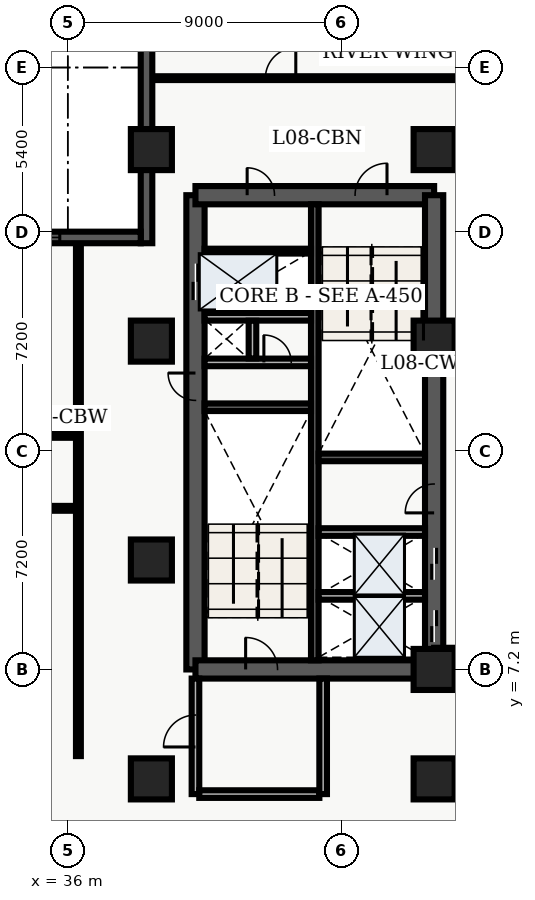
"""IFC4 building model, lengths in metres.
Left out: names, types, materials, properties, quantities, classifications, styles, units other than length and angle.
Written with IfcOpenShell. Run it as: python <this file> out.ifc"""

import sys

from ifc_helpers import new_model, entity, si_unit, converted_unit, direction, frame, origin_with_axes, origin_2d_with_axis, place, context, subcontext, project, spatial, polyline, rectangle, outline, extrude, element, fill, save


model = new_model("IFC4")
c1 = context("Model", 3, precision=1e-05, world=origin_with_axes(), true_north=direction((0.0, 1.0)))
c2 = subcontext(c1, "Body", "Model", "MODEL_VIEW")
j1 = project(units=[si_unit("LENGTHUNIT", "METRE"), converted_unit("PLANEANGLEUNIT", "DEGREE", entity("IfcPlaneAngleMeasure", 0.017), si_unit("PLANEANGLEUNIT", "RADIAN"), dimensions=[0, 0, 0, 0, 0, 0, 0])], contexts=[c1])
p1 = place(None, origin_with_axes())
s1 = spatial("IfcSite", under=j1, at=p1, CompositionType="ELEMENT")
p2 = place(p1, origin_with_axes())
s2 = spatial("IfcBuilding", under=s1, at=p2, CompositionType="ELEMENT")
p3 = place(p2, frame((0.0, 0.0, 36.6), z_axis=(0.0, 0.0, 1.0), x_axis=(1.0, 0.0, 0.0)))
s3 = spatial("IfcBuildingStorey", under=s2, at=p3, CompositionType="ELEMENT", Elevation=36.6)
p4 = place(p3, frame((40.2, 7.2, 0.0), z_axis=(0.0, 0.0, 1.0), x_axis=(0.0, 1.0, 0.0)))
e1 = element("IfcWall", 1, at=p4, inside=s3, PredefinedType="SHEAR", context=c2, shape_type="SweptSolid", body=[
    extrude(outline(polyline([(0.0, -0.3), (15.6, -0.3), (15.6, 0.3), (0.0, 0.3), (0.0, -0.3)])), origin_with_axes(), (0.0, 0.0, 1.0), 3.66),
])
p5 = place(p4, frame((12.75, 0.0, 0.0), z_axis=(0.0, 0.0, 1.0), x_axis=(1.0, 0.0, 0.0)))
e2 = element("IfcOpeningElement", 2, at=p5, cuts=e1, PredefinedType="OPENING", context=c2, shape_type="SweptSolid", body=[
    extrude(rectangle(XDim=1.2, YDim=0.62, at=origin_2d_with_axis()), origin_with_axes(), (0.0, 0.0, 1.0), 2.15),
])
p6 = place(p4, frame((9.3, 0.0, 0.0), z_axis=(0.0, 0.0, 1.0), x_axis=(1.0, 0.0, 0.0)))
e3 = element("IfcOpeningElement", 3, at=p6, cuts=e1, PredefinedType="OPENING", context=c2, shape_type="SweptSolid", body=[
    extrude(rectangle(XDim=0.9, YDim=0.62, at=origin_2d_with_axis()), origin_with_axes(), (0.0, 0.0, 1.0), 2.15),
])
p7 = place(p3, frame((40.2, 7.2, 0.0), z_axis=(0.0, 0.0, 1.0), x_axis=(1.0, 0.0, 0.0)))
e4 = element("IfcWall", 4, at=p7, inside=s3, PredefinedType="SHEAR", context=c2, shape_type="SweptSolid", body=[
    extrude(outline(polyline([(0.0, -0.3), (7.85, -0.3), (7.85, 0.3), (0.0, 0.3), (0.0, -0.3)])), origin_with_axes(), (0.0, 0.0, 1.0), 3.66),
])
p8 = place(p7, frame((2.175, 0.0, 0.0), z_axis=(0.0, 0.0, 1.0), x_axis=(1.0, 0.0, 0.0)))
e5 = element("IfcOpeningElement", 5, at=p8, cuts=e4, PredefinedType="OPENING", context=c2, shape_type="SweptSolid", body=[
    extrude(rectangle(XDim=1.05, YDim=0.62, at=origin_2d_with_axis()), origin_with_axes(), (0.0, 0.0, 1.0), 2.15),
])
p9 = place(p3, frame((40.2, 22.8, 0.0), z_axis=(0.0, 0.0, 1.0), x_axis=(1.0, 0.0, 0.0)))
e6 = element("IfcWall", 6, at=p9, inside=s3, PredefinedType="SHEAR", context=c2, shape_type="SweptSolid", body=[
    extrude(outline(polyline([(0.0, -0.3), (7.85, -0.3), (7.85, 0.3), (0.0, 0.3), (0.0, -0.3)])), origin_with_axes(), (0.0, 0.0, 1.0), 3.66),
])
p10 = place(p9, frame((5.775, 0.0, 0.0), z_axis=(0.0, 0.0, 1.0), x_axis=(1.0, 0.0, 0.0)))
e7 = element("IfcOpeningElement", 7, at=p10, cuts=e6, PredefinedType="OPENING", context=c2, shape_type="SweptSolid", body=[
    extrude(rectangle(XDim=1.05, YDim=0.62, at=origin_2d_with_axis()), origin_with_axes(), (0.0, 0.0, 1.0), 2.15),
])
p11 = place(p9, frame((2.15, 0.0, 0.0), z_axis=(0.0, 0.0, 1.0), x_axis=(1.0, 0.0, 0.0)))
e8 = element("IfcOpeningElement", 8, at=p11, cuts=e6, PredefinedType="OPENING", context=c2, shape_type="SweptSolid", body=[
    extrude(rectangle(XDim=0.9, YDim=0.62, at=origin_2d_with_axis()), origin_with_axes(), (0.0, 0.0, 1.0), 2.15),
])
p12 = place(p3, frame((48.05, 7.2, 0.0), z_axis=(0.0, 0.0, 1.0), x_axis=(0.0, 1.0, 0.0)))
e9 = element("IfcWall", 9, at=p12, inside=s3, PredefinedType="SHEAR", context=c2, shape_type="SweptSolid", body=[
    extrude(outline(polyline([(0.0, -0.3), (15.6, -0.3), (15.6, 0.3), (0.0, 0.3), (0.0, -0.3)])), origin_with_axes(), (0.0, 0.0, 1.0), 3.66),
])
p13 = place(p12, frame((1.425, 0.0, 0.0), z_axis=(0.0, 0.0, 1.0), x_axis=(1.0, 0.0, 0.0)))
e10 = element("IfcOpeningElement", 10, at=p13, cuts=e9, PredefinedType="OPENING", context=c2, shape_type="SweptSolid", body=[
    extrude(rectangle(XDim=1.05, YDim=0.62, at=origin_2d_with_axis()), origin_with_axes(), (0.0, 0.0, 1.0), 2.15),
])
p14 = place(p12, frame((3.475, 0.0, 0.0), z_axis=(0.0, 0.0, 1.0), x_axis=(1.0, 0.0, 0.0)))
e11 = element("IfcOpeningElement", 11, at=p14, cuts=e9, PredefinedType="OPENING", context=c2, shape_type="SweptSolid", body=[
    extrude(rectangle(XDim=1.05, YDim=0.62, at=origin_2d_with_axis()), origin_with_axes(), (0.0, 0.0, 1.0), 2.15),
])
p15 = place(p12, frame((5.625, 0.0, 0.0), z_axis=(0.0, 0.0, 1.0), x_axis=(1.0, 0.0, 0.0)))
e12 = element("IfcOpeningElement", 12, at=p15, cuts=e9, PredefinedType="OPENING", context=c2, shape_type="SweptSolid", body=[
    extrude(rectangle(XDim=0.95, YDim=0.62, at=origin_2d_with_axis()), origin_with_axes(), (0.0, 0.0, 1.0), 2.15),
])
p16 = place(p3, frame((44.125, 7.5, 0.0), z_axis=(0.0, 0.0, 1.0), x_axis=(0.0, 1.0, 0.0)))
e13 = element("IfcWall", 13, at=p16, inside=s3, PredefinedType="SHEAR", context=c2, shape_type="SweptSolid", body=[
    extrude(outline(polyline([(0.0, -0.125), (15.0, -0.125), (15.0, 0.125), (0.0, 0.125), (0.0, -0.125)])), origin_with_axes(), (0.0, 0.0, 1.0), 3.66),
])
for number, where, z_axis, x_axis in (
    (14, (40.5, 15.825, 0.0), (0.0, 0.0, 1.0), (1.0, 0.0, 0.0)),
    (15, (44.25, 14.175, 0.0), (0.0, 0.0, 1.0), (1.0, 0.0, 0.0)),
):
    element("IfcWall", number, at=place(p3, frame(where, z_axis=z_axis, x_axis=x_axis)), inside=s3, PredefinedType="SHEAR", context=c2, shape_type="SweptSolid", body=[
        extrude(outline(polyline([(0.0, -0.125), (3.5, -0.125), (3.5, 0.125), (0.0, 0.125), (0.0, -0.125)])), origin_with_axes(), (0.0, 0.0, 1.0), 3.66),
    ])
p17 = place(p3, frame((40.5, 17.3, 0.0), z_axis=(0.0, 0.0, 1.0), x_axis=(1.0, 0.0, 0.0)))
e16 = element("IfcWall", 16, at=p17, inside=s3, PredefinedType="SOLIDWALL", context=c2, shape_type="SweptSolid", body=[
    extrude(outline(polyline([(0.0, -0.125), (3.5, -0.125), (3.5, 0.125), (0.0, 0.125), (0.0, -0.125)])), origin_with_axes(), (0.0, 0.0, 1.0), 2.7),
])
p18 = place(p17, frame((2.4, 0.0, 0.0), z_axis=(0.0, 0.0, 1.0), x_axis=(1.0, 0.0, 0.0)))
e17 = element("IfcOpeningElement", 17, at=p18, cuts=e16, PredefinedType="OPENING", context=c2, shape_type="SweptSolid", body=[
    extrude(rectangle(XDim=0.9, YDim=0.27, at=origin_2d_with_axis()), origin_with_axes(), (0.0, 0.0, 1.0), 2.15),
])
p19 = place(p3, frame((40.5, 18.8, 0.0), z_axis=(0.0, 0.0, 1.0), x_axis=(1.0, 0.0, 0.0)))
e18 = element("IfcWall", 18, at=p19, inside=s3, PredefinedType="SOLIDWALL", context=c2, shape_type="SweptSolid", body=[
    extrude(outline(polyline([(0.0, -0.125), (3.5, -0.125), (3.5, 0.125), (0.0, 0.125), (0.0, -0.125)])), origin_with_axes(), (0.0, 0.0, 1.0), 2.7),
])
p20 = place(p3, frame((42.075, 17.43, 0.0), z_axis=(0.0, 0.0, 1.0), x_axis=(0.0, 1.0, 0.0)))
e19 = element("IfcWall", 19, at=p20, inside=s3, PredefinedType="SOLIDWALL", context=c2, shape_type="SweptSolid", body=[
    extrude(outline(polyline([(0.0, -0.125), (1.24, -0.125), (1.24, 0.125), (0.0, 0.125), (0.0, -0.125)])), origin_with_axes(), (0.0, 0.0, 1.0), 2.7),
])
p21 = place(p3, frame((40.2, 3.1, 0.0), z_axis=(0.0, 0.0, 1.0), x_axis=(0.0, 1.0, 0.0)))
e20 = element("IfcWall", 20, at=p21, inside=s3, PredefinedType="SOLIDWALL", context=c2, shape_type="SweptSolid", body=[
    extrude(outline(polyline([(0.0, -0.125), (3.8, -0.125), (3.8, 0.125), (0.0, 0.125), (0.0, -0.125)])), origin_with_axes(), (0.0, 0.0, 1.0), 2.7),
])
p22 = place(p21, frame((2.075, 0.0, 0.0), z_axis=(0.0, 0.0, 1.0), x_axis=(1.0, 0.0, 0.0)))
e21 = element("IfcOpeningElement", 21, at=p22, cuts=e20, PredefinedType="OPENING", context=c2, shape_type="SweptSolid", body=[
    extrude(rectangle(XDim=1.05, YDim=0.27, at=origin_2d_with_axis()), origin_with_axes(), (0.0, 0.0, 1.0), 2.15),
])
p23 = place(p3, frame((40.325, 3.1, 0.0), z_axis=(0.0, 0.0, 1.0), x_axis=(1.0, 0.0, 0.0)))
e22 = element("IfcWall", 22, at=p23, inside=s3, PredefinedType="SOLIDWALL", context=c2, shape_type="SweptSolid", body=[
    extrude(outline(polyline([(0.0, -0.125), (3.95, -0.125), (3.95, 0.125), (0.0, 0.125), (0.0, -0.125)])), origin_with_axes(), (0.0, 0.0, 1.0), 2.7),
])
p24 = place(p3, frame((44.4, 3.1, 0.0), z_axis=(0.0, 0.0, 1.0), x_axis=(0.0, 1.0, 0.0)))
e23 = element("IfcWall", 23, at=p24, inside=s3, PredefinedType="SOLIDWALL", context=c2, shape_type="SweptSolid", body=[
    extrude(outline(polyline([(0.0, -0.125), (3.8, -0.125), (3.8, 0.125), (0.0, 0.125), (0.0, -0.125)])), origin_with_axes(), (0.0, 0.0, 1.0), 2.7),
])
for number, where, z_axis, x_axis in (
    (24, (38.75, 3.6, 0.0), (0.0, 0.0, 1.0), (1.0, 0.0, 0.0)),
    (25, (38.75, 10.8, 0.0), (0.0, 0.0, 1.0), (1.0, 0.0, 0.0)),
    (26, (38.75, 18.0, 0.0), (0.0, 0.0, 1.0), (1.0, 0.0, 0.0)),
    (27, (38.75, 24.3, 0.0), (0.0, 0.0, 1.0), (1.0, 0.0, 0.0)),
    (28, (48.05, 3.6, 0.0), (0.0, 0.0, 1.0), (1.0, 0.0, 0.0)),
    (29, (48.05, 7.2, 0.0), (0.0, 0.0, 1.0), (1.0, 0.0, 0.0)),
    (30, (48.05, 18.0, 0.0), (0.0, 0.0, 1.0), (1.0, 0.0, 0.0)),
    (31, (48.05, 24.3, 0.0), (0.0, 0.0, 1.0), (1.0, 0.0, 0.0)),
):
    element("IfcColumn", number, at=place(p3, frame(where, z_axis=z_axis, x_axis=x_axis)), inside=s3, PredefinedType="COLUMN", context=c2, shape_type="SweptSolid", body=[
        extrude(rectangle(XDim=1.35, YDim=1.35, at=origin_2d_with_axis()), origin_with_axes(), (0.0, 0.0, 1.0), 3.9),
    ])
p25 = place(p3, frame((40.5, 20.96, 0.0), z_axis=(0.0, 0.0, 1.0), x_axis=(1.0, 0.0, 0.0)))
e32 = element("IfcWall", 32, at=p25, inside=s3, PredefinedType="PARTITIONING", context=c2, shape_type="SweptSolid", body=[
    extrude(outline(polyline([(0.0, -0.08), (3.5, -0.08), (3.5, 0.08), (0.0, 0.08), (0.0, -0.08)])), origin_with_axes(), (0.0, 0.0, 1.0), 2.7),
])
for number, where, z_axis, x_axis in (
    (33, (44.25, 9.62, 0.0), (0.0, 0.0, 1.0), (1.0, 0.0, 0.0)),
    (34, (44.25, 11.72, 0.0), (0.0, 0.0, 1.0), (1.0, 0.0, 0.0)),
):
    element("IfcWall", number, at=place(p3, frame(where, z_axis=z_axis, x_axis=x_axis)), inside=s3, PredefinedType="SOLIDWALL", context=c2, shape_type="SweptSolid", body=[
        extrude(outline(polyline([(0.0, -0.125), (3.5, -0.125), (3.5, 0.125), (0.0, 0.125), (0.0, -0.125)])), origin_with_axes(), (0.0, 0.0, 1.0), 2.7),
    ])
p26 = place(p3, frame((21.15, 12.5, 0.0), z_axis=(0.0, 0.0, 1.0), x_axis=(1.0, 0.0, 0.0)))
e35 = element("IfcWall", 35, at=p26, inside=s3, PredefinedType="PARTITIONING", context=c2, shape_type="SweptSolid", body=[
    extrude(outline(polyline([(0.0, -0.08), (15.2, -0.08), (15.2, 0.08), (0.0, 0.08), (0.0, -0.08)])), origin_with_axes(), (0.0, 0.0, 1.0), 2.7),
])
p27 = place(p26, frame((3.508, 0.0, 0.0), z_axis=(0.0, 0.0, 1.0), x_axis=(1.0, 0.0, 0.0)))
e36 = element("IfcOpeningElement", 36, at=p27, cuts=e35, PredefinedType="OPENING", context=c2, shape_type="SweptSolid", body=[
    extrude(rectangle(XDim=1.0, YDim=0.18, at=origin_2d_with_axis()), origin_with_axes(), (0.0, 0.0, 1.0), 2.15),
])
p28 = place(p26, frame((10.978, 0.0, 0.0), z_axis=(0.0, 0.0, 1.0), x_axis=(1.0, 0.0, 0.0)))
e37 = element("IfcOpeningElement", 37, at=p28, cuts=e35, PredefinedType="OPENING", context=c2, shape_type="SweptSolid", body=[
    extrude(rectangle(XDim=1.2, YDim=0.18, at=origin_2d_with_axis()), origin_with_axes(), (0.0, 0.0, 1.0), 2.2),
])
p29 = place(p3, frame((21.15, 14.9, 0.0), z_axis=(0.0, 0.0, 1.0), x_axis=(1.0, 0.0, 0.0)))
e38 = element("IfcWall", 38, at=p29, inside=s3, PredefinedType="PARTITIONING", context=c2, shape_type="SweptSolid", body=[
    extrude(outline(polyline([(0.0, -0.08), (15.2, -0.08), (15.2, 0.08), (0.0, 0.08), (0.0, -0.08)])), origin_with_axes(), (0.0, 0.0, 1.0), 2.7),
])
p30 = place(p29, frame((3.49, 0.0, 0.0), z_axis=(0.0, 0.0, 1.0), x_axis=(1.0, 0.0, 0.0)))
e39 = element("IfcOpeningElement", 39, at=p30, cuts=e38, PredefinedType="OPENING", context=c2, shape_type="SweptSolid", body=[
    extrude(rectangle(XDim=1.0, YDim=0.18, at=origin_2d_with_axis()), origin_with_axes(), (0.0, 0.0, 1.0), 2.15),
])
p31 = place(p29, frame((10.96, 0.0, 0.0), z_axis=(0.0, 0.0, 1.0), x_axis=(1.0, 0.0, 0.0)))
e40 = element("IfcOpeningElement", 40, at=p31, cuts=e38, PredefinedType="OPENING", context=c2, shape_type="SweptSolid", body=[
    extrude(rectangle(XDim=1.0, YDim=0.18, at=origin_2d_with_axis()), origin_with_axes(), (0.0, 0.0, 1.0), 2.15),
])
p32 = place(p3, frame((36.35, 4.35, 0.0), z_axis=(0.0, 0.0, 1.0), x_axis=(0.0, 1.0, 0.0)))
e41 = element("IfcWall", 41, at=p32, inside=s3, PredefinedType="PARTITIONING", context=c2, shape_type="SweptSolid", body=[
    extrude(outline(polyline([(0.0, -0.08), (16.95, -0.08), (16.95, 0.08), (0.0, 0.08), (0.0, -0.08)])), origin_with_axes(), (0.0, 0.0, 1.0), 2.7),
])
p33 = place(p3, frame((59.64, 7.85, 0.0), z_axis=(0.0, 0.0, 1.0), x_axis=(-1.0, 0.0, 0.0)))
e42 = element("IfcWall", 42, at=p33, inside=s3, PredefinedType="PARTITIONING", context=c2, shape_type="SweptSolid", body=[
    extrude(outline(polyline([(0.0, -0.062), (11.59, -0.062), (11.59, 0.062), (0.0, 0.062), (0.0, -0.062)])), origin_with_axes(), (0.0, 0.0, 1.0), 2.7),
])
p34 = place(p33, frame((10.29, 0.0, 0.0), z_axis=(0.0, 0.0, 1.0), x_axis=(1.0, 0.0, 0.0)))
e43 = element("IfcOpeningElement", 43, at=p34, cuts=e42, PredefinedType="OPENING", context=c2, shape_type="SweptSolid", body=[
    extrude(rectangle(XDim=1.0, YDim=0.145, at=origin_2d_with_axis()), origin_with_axes(), (0.0, 0.0, 1.0), 2.15),
])
p35 = place(p3, frame((38.76, 26.65, 0.0), z_axis=(0.0, 0.0, 1.0), x_axis=(1.0, 0.0, 0.0)))
e44 = element("IfcWall", 44, at=p35, inside=s3, PredefinedType="PARTITIONING", context=c2, shape_type="SweptSolid", body=[
    extrude(outline(polyline([(0.0, -0.062), (20.88, -0.062), (20.88, 0.062), (0.0, 0.062), (0.0, -0.062)])), origin_with_axes(), (0.0, 0.0, 1.0), 2.7),
])
p36 = place(p35, frame((4.24, 0.0, 0.0), z_axis=(0.0, 0.0, 1.0), x_axis=(1.0, 0.0, 0.0)))
e45 = element("IfcOpeningElement", 45, at=p36, cuts=e44, PredefinedType="OPENING", context=c2, shape_type="SweptSolid", body=[
    extrude(rectangle(XDim=1.0, YDim=0.145, at=origin_2d_with_axis()), origin_with_axes(), (0.0, 0.0, 1.0), 2.15),
])
p37 = place(p3, frame((38.59, 21.22, 0.0), z_axis=(0.0, 0.0, 1.0), x_axis=(0.0, 1.0, 0.0)))
e46 = element("IfcWall", 46, at=p37, inside=s3, PredefinedType="SOLIDWALL", context=c2, shape_type="SweptSolid", body=[
    extrude(outline(polyline([(0.0, -0.19), (7.58, -0.19), (7.58, 0.19), (0.0, 0.19), (0.0, -0.19)])), origin_with_axes(), (0.0, 0.0, 1.0), 3.66),
])
p38 = place(p3, frame((21.22, 21.41, 0.0), z_axis=(0.0, 0.0, 1.0), x_axis=(1.0, 0.0, 0.0)))
e47 = element("IfcWall", 47, at=p38, inside=s3, PredefinedType="SOLIDWALL", context=c2, shape_type="SweptSolid", body=[
    extrude(outline(polyline([(0.0, -0.19), (17.18, -0.19), (17.18, 0.19), (0.0, 0.19), (0.0, -0.19)])), origin_with_axes(), (0.0, 0.0, 1.0), 3.66),
])
p39 = place(p38, frame((3.263, 0.0, 0.45), z_axis=(0.0, 0.0, 1.0), x_axis=(1.0, 0.0, 0.0)))
e48 = element("IfcOpeningElement", 48, at=p39, cuts=e47, PredefinedType="OPENING", context=c2, shape_type="SweptSolid", body=[
    extrude(rectangle(XDim=2.1, YDim=0.4, at=origin_2d_with_axis()), origin_with_axes(), (0.0, 0.0, 1.0), 2.2),
])
p40 = place(p38, frame((8.59, 0.0, 0.45), z_axis=(0.0, 0.0, 1.0), x_axis=(1.0, 0.0, 0.0)))
e49 = element("IfcOpeningElement", 49, at=p40, cuts=e47, PredefinedType="OPENING", context=c2, shape_type="SweptSolid", body=[
    extrude(rectangle(XDim=2.1, YDim=0.4, at=origin_2d_with_axis()), origin_with_axes(), (0.0, 0.0, 1.0), 2.2),
])
p41 = place(p38, frame((13.467, 0.0, 0.45), z_axis=(0.0, 0.0, 1.0), x_axis=(1.0, 0.0, 0.0)))
e50 = element("IfcOpeningElement", 50, at=p41, cuts=e47, PredefinedType="OPENING", context=c2, shape_type="SweptSolid", body=[
    extrude(rectangle(XDim=2.1, YDim=0.4, at=origin_2d_with_axis()), origin_with_axes(), (0.0, 0.0, 1.0), 2.2),
])
p42 = place(p12, frame((1.425, 0.0, 0.0), z_axis=(0.0, 0.0, 1.0), x_axis=(1.0, 0.0, 0.0)))
e51 = element("IfcDoor", 51, at=p42, inside=s3, OperationType="SLIDING_TO_LEFT", PredefinedType="DOOR", context=c2, shape_type="SweptSolid", body=[
    extrude(rectangle(XDim=1.05, YDim=0.09, at=origin_2d_with_axis()), origin_with_axes(), (0.0, 0.0, 1.0), 2.15),
])
fill(e10, e51)
p43 = place(p12, frame((3.475, 0.0, 0.0), z_axis=(0.0, 0.0, 1.0), x_axis=(1.0, 0.0, 0.0)))
e52 = element("IfcDoor", 52, at=p43, inside=s3, OperationType="SLIDING_TO_RIGHT", PredefinedType="DOOR", context=c2, shape_type="SweptSolid", body=[
    extrude(rectangle(XDim=1.05, YDim=0.09, at=origin_2d_with_axis()), origin_with_axes(), (0.0, 0.0, 1.0), 2.15),
])
fill(e11, e52)
p44 = place(p4, frame((12.75, 0.0, 0.0), z_axis=(0.0, 0.0, 1.0), x_axis=(1.0, 0.0, 0.0)))
e53 = element("IfcDoor", 53, at=p44, inside=s3, OperationType="DOUBLE_DOOR_SLIDING", PredefinedType="DOOR", context=c2, shape_type="SweptSolid", body=[
    extrude(rectangle(XDim=1.2, YDim=0.09, at=origin_2d_with_axis()), origin_with_axes(), (0.0, 0.0, 1.0), 2.15),
])
fill(e2, e53)
p45 = place(p4, frame((9.3, 0.0, 0.0), z_axis=(0.0, 0.0, 1.0), x_axis=(1.0, 0.0, 0.0)))
e54 = element("IfcDoor", 54, at=p45, inside=s3, OperationType="SINGLE_SWING_RIGHT", PredefinedType="DOOR", context=c2, shape_type="SweptSolid", body=[
    extrude(rectangle(XDim=0.9, YDim=0.09, at=origin_2d_with_axis()), origin_with_axes(), (0.0, 0.0, 1.0), 2.15),
])
fill(e3, e54)
p46 = place(p17, frame((2.4, 0.0, 0.0), z_axis=(0.0, 0.0, 1.0), x_axis=(1.0, 0.0, 0.0)))
e55 = element("IfcDoor", 55, at=p46, inside=s3, OperationType="SINGLE_SWING_LEFT", PredefinedType="DOOR", context=c2, shape_type="SweptSolid", body=[
    extrude(rectangle(XDim=0.9, YDim=0.09, at=origin_2d_with_axis()), origin_with_axes(), (0.0, 0.0, 1.0), 2.15),
])
fill(e17, e55)
p47 = place(p7, frame((2.175, 0.0, 0.0), z_axis=(0.0, 0.0, 1.0), x_axis=(1.0, 0.0, 0.0)))
e56 = element("IfcDoor", 56, at=p47, inside=s3, OperationType="SINGLE_SWING_LEFT", PredefinedType="DOOR", context=c2, shape_type="SweptSolid", body=[
    extrude(rectangle(XDim=1.05, YDim=0.09, at=origin_2d_with_axis()), origin_with_axes(), (0.0, 0.0, 1.0), 2.15),
])
fill(e5, e56)
p48 = place(p9, frame((5.775, 0.0, 0.0), z_axis=(0.0, 0.0, 1.0), x_axis=(1.0, 0.0, 0.0)))
e57 = element("IfcDoor", 57, at=p48, inside=s3, OperationType="SINGLE_SWING_RIGHT", PredefinedType="DOOR", context=c2, shape_type="SweptSolid", body=[
    extrude(rectangle(XDim=1.05, YDim=0.09, at=origin_2d_with_axis()), origin_with_axes(), (0.0, 0.0, 1.0), 2.15),
])
fill(e7, e57)
p49 = place(p21, frame((2.075, 0.0, 0.0), z_axis=(0.0, 0.0, 1.0), x_axis=(1.0, 0.0, 0.0)))
e58 = element("IfcDoor", 58, at=p49, inside=s3, OperationType="SINGLE_SWING_LEFT", PredefinedType="DOOR", context=c2, shape_type="SweptSolid", body=[
    extrude(rectangle(XDim=1.05, YDim=0.09, at=origin_2d_with_axis()), origin_with_axes(), (0.0, 0.0, 1.0), 2.15),
])
fill(e21, e58)
p50 = place(p9, frame((2.15, 0.0, 0.0), z_axis=(0.0, 0.0, 1.0), x_axis=(1.0, 0.0, 0.0)))
e59 = element("IfcDoor", 59, at=p50, inside=s3, OperationType="SINGLE_SWING_LEFT", PredefinedType="DOOR", context=c2, shape_type="SweptSolid", body=[
    extrude(rectangle(XDim=0.9, YDim=0.09, at=origin_2d_with_axis()), origin_with_axes(), (0.0, 0.0, 1.0), 2.15),
])
fill(e8, e59)
p51 = place(p12, frame((5.625, 0.0, 0.0), z_axis=(0.0, 0.0, 1.0), x_axis=(1.0, 0.0, 0.0)))
e60 = element("IfcDoor", 60, at=p51, inside=s3, OperationType="SINGLE_SWING_LEFT", PredefinedType="DOOR", context=c2, shape_type="SweptSolid", body=[
    extrude(rectangle(XDim=0.95, YDim=0.09, at=origin_2d_with_axis()), origin_with_axes(), (0.0, 0.0, 1.0), 2.15),
])
fill(e12, e60)
p52 = place(p35, frame((4.24, 0.0, 0.0), z_axis=(0.0, 0.0, 1.0), x_axis=(1.0, 0.0, 0.0)))
e61 = element("IfcDoor", 61, at=p52, inside=s3, OperationType="SINGLE_SWING_RIGHT", PredefinedType="DOOR", context=c2, shape_type="SweptSolid", body=[
    extrude(rectangle(XDim=1.0, YDim=0.075, at=origin_2d_with_axis()), origin_with_axes(), (0.0, 0.0, 1.0), 2.15),
])
fill(e45, e61)
p53 = place(p38, frame((13.467, 0.0, 0.45), z_axis=(0.0, 0.0, 1.0), x_axis=(1.0, 0.0, 0.0)))
e62 = element("IfcWindow", 62, at=p53, inside=s3, PredefinedType="WINDOW", context=c2, shape_type="SweptSolid", body=[
    extrude(rectangle(XDim=2.1, YDim=0.09, at=origin_2d_with_axis()), origin_with_axes(), (0.0, 0.0, 1.0), 2.2),
])
fill(e50, e62)
save(model, sys.argv[1])
